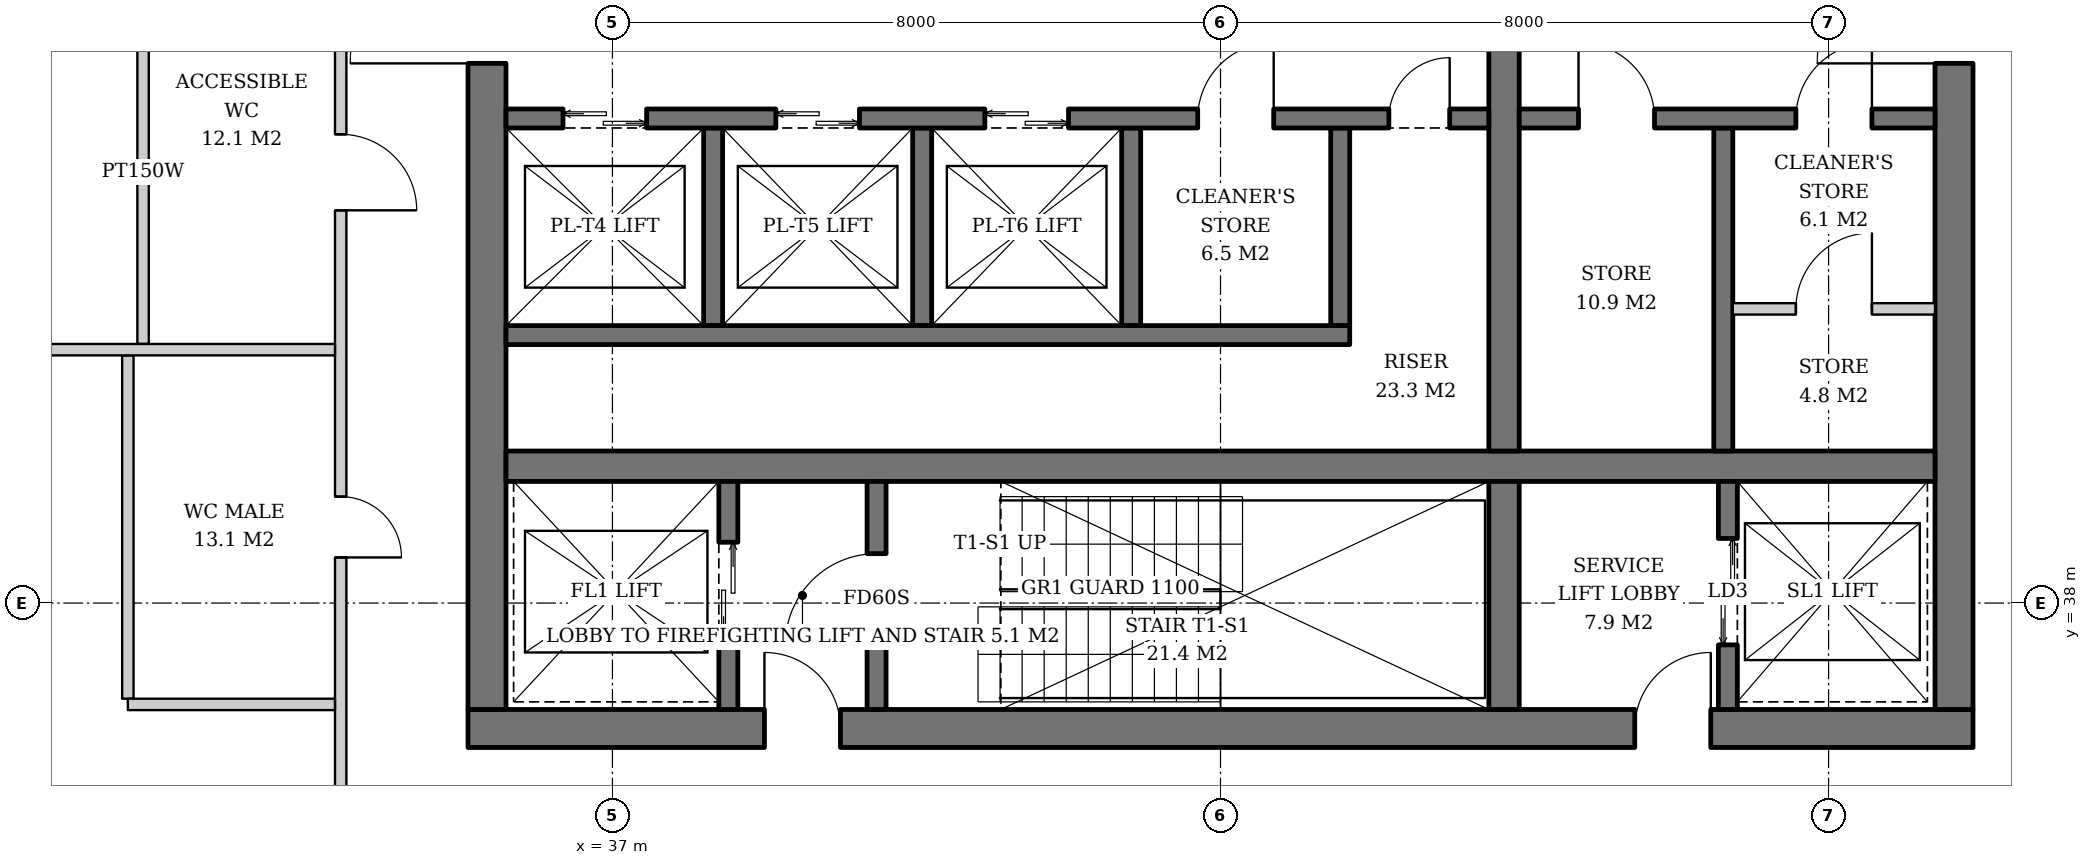
"""IFC4 building model, lengths in metres.
Left out: names, types, materials, properties, quantities, classifications, styles, units other than length and angle.
Written with IfcOpenShell. Run it as: python <this file> out.ifc"""

import sys

from ifc_helpers import new_model, si_unit, direction, frame, frame_2d, origin, place, context, subcontext, project, spatial, rectangle, extrude, element, fill, save


model = new_model("IFC4")
c1 = context("Model", 3, precision=1e-05, world=origin(), true_north=direction((0.0, 1.0)))
c2 = subcontext(c1, "Body", "Model", "MODEL_VIEW")
j1 = project(units=[si_unit("LENGTHUNIT", "METRE"), si_unit("PLANEANGLEUNIT", "RADIAN")], contexts=[c1])
p1 = place(None, origin())
s1 = spatial("IfcSite", under=j1, at=p1, CompositionType="ELEMENT")
p2 = place(p1, origin())
s2 = spatial("IfcBuilding", under=s1, at=p2, CompositionType="ELEMENT")
p3 = place(p2, frame((0.0, 0.0, 268.0)))
s3 = spatial("IfcBuildingStorey", under=s2, at=p3, CompositionType="ELEMENT", Elevation=268.0)
p4 = place(p3, frame((35.1, 36.35, 0.0), z_axis=(0.0, 0.0, 1.0), x_axis=(1.0, 0.0, 0.0)))
e1 = element("IfcWall", 1, at=p4, inside=s3, PredefinedType="SHEAR", context=c2, shape_type="SweptSolid", body=[
    extrude(rectangle(XDim=19.8, YDim=0.5, at=frame_2d((9.9, 0.0))), origin(), (0.0, 0.0, 1.0), 3.8),
])
p5 = place(p4, frame((3.9, 0.0, 0.0)))
e2 = element("IfcOpeningElement", 2, at=p5, cuts=e1, PredefinedType="OPENING", context=c2, shape_type="SweptSolid", body=[
    extrude(rectangle(XDim=1.0, YDim=2.1, at=frame_2d((0.5, 1.05))), frame((0.0, 0.26, 0.0), z_axis=(0.0, -1.0, 0.0), x_axis=(1.0, 0.0, 0.0)), (0.0, 0.0, 1.0), 0.52),
])
p6 = place(p4, frame((15.35, 0.0, 0.0)))
e3 = element("IfcOpeningElement", 3, at=p6, cuts=e1, PredefinedType="OPENING", context=c2, shape_type="SweptSolid", body=[
    extrude(rectangle(XDim=1.0, YDim=2.1, at=frame_2d((0.5, 1.05))), frame((0.0, 0.26, 0.0), z_axis=(0.0, -1.0, 0.0), x_axis=(1.0, 0.0, 0.0)), (0.0, 0.0, 1.0), 0.52),
])
p7 = place(p3, frame((35.35, 36.6, 0.0), z_axis=(0.0, 0.0, 1.0), x_axis=(0.0, 1.0, 0.0)))
e4 = element("IfcWall", 4, at=p7, inside=s3, PredefinedType="SHEAR", context=c2, shape_type="SweptSolid", body=[
    extrude(rectangle(XDim=18.8, YDim=0.5, at=frame_2d((9.4, 0.0))), origin(), (0.0, 0.0, 1.0), 3.8),
])
p8 = place(p7, frame((8.5, 0.0, 0.0)))
e5 = element("IfcOpeningElement", 5, at=p8, cuts=e4, PredefinedType="OPENING", context=c2, shape_type="SweptSolid", body=[
    extrude(rectangle(XDim=1.8, YDim=2.4, at=frame_2d((0.9, 1.2))), frame((0.0, 0.26, 0.0), z_axis=(0.0, -1.0, 0.0), x_axis=(1.0, 0.0, 0.0)), (0.0, 0.0, 1.0), 0.52),
])
p9 = place(p3, frame((54.65, 36.6, 0.0), z_axis=(0.0, 0.0, 1.0), x_axis=(0.0, 1.0, 0.0)))
e6 = element("IfcWall", 6, at=p9, inside=s3, PredefinedType="SHEAR", context=c2, shape_type="SweptSolid", body=[
    extrude(rectangle(XDim=18.8, YDim=0.5, at=frame_2d((9.4, 0.0))), origin(), (0.0, 0.0, 1.0), 3.8),
])
p10 = place(p9, frame((8.5, 0.0, 0.0)))
e7 = element("IfcOpeningElement", 7, at=p10, cuts=e6, PredefinedType="OPENING", context=c2, shape_type="SweptSolid", body=[
    extrude(rectangle(XDim=1.8, YDim=2.4, at=frame_2d((0.9, 1.2))), frame((0.0, 0.26, 0.0), z_axis=(0.0, -1.0, 0.0), x_axis=(1.0, 0.0, 0.0)), (0.0, 0.0, 1.0), 0.52),
])
p11 = place(p3, frame((35.6, 39.8, 0.0), z_axis=(0.0, 0.0, 1.0), x_axis=(1.0, 0.0, 0.0)))
e8 = element("IfcWall", 8, at=p11, inside=s3, PredefinedType="SHEAR", context=c2, shape_type="SweptSolid", body=[
    extrude(rectangle(XDim=18.8, YDim=0.4, at=frame_2d((9.4, 0.0))), origin(), (0.0, 0.0, 1.0), 3.8),
])
p12 = place(p3, frame((48.73, 36.6, 0.0), z_axis=(0.0, 0.0, 1.0), x_axis=(0.0, 1.0, 0.0)))
e9 = element("IfcWall", 9, at=p12, inside=s3, PredefinedType="SHEAR", context=c2, shape_type="SweptSolid", body=[
    extrude(rectangle(XDim=3.0, YDim=0.4, at=frame_2d((1.5, 0.0))), origin(), (0.0, 0.0, 1.0), 3.8),
])
p13 = place(p3, frame((48.73, 40.0, 0.0), z_axis=(0.0, 0.0, 1.0), x_axis=(0.0, 1.0, 0.0)))
e10 = element("IfcWall", 10, at=p13, inside=s3, PredefinedType="SHEAR", context=c2, shape_type="SweptSolid", body=[
    extrude(rectangle(XDim=12.0, YDim=0.4, at=frame_2d((6.0, 0.0))), origin(), (0.0, 0.0, 1.0), 3.8),
])
p14 = place(p3, frame((38.525, 36.6, 0.0), z_axis=(0.0, 0.0, 1.0), x_axis=(0.0, 1.0, 0.0)))
e11 = element("IfcWall", 11, at=p14, inside=s3, PredefinedType="SHEAR", context=c2, shape_type="SweptSolid", body=[
    extrude(rectangle(XDim=3.0, YDim=0.25, at=frame_2d((1.5, 0.0))), origin(), (0.0, 0.0, 1.0), 3.8),
])
p15 = place(p14, frame((0.9, 0.0, 0.0)))
e12 = element("IfcOpeningElement", 12, at=p15, cuts=e11, PredefinedType="OPENING", context=c2, shape_type="SweptSolid", body=[
    extrude(rectangle(XDim=1.3, YDim=2.2, at=frame_2d((0.65, 1.1))), frame((0.0, 0.135, 0.0), z_axis=(0.0, -1.0, 0.0), x_axis=(1.0, 0.0, 0.0)), (0.0, 0.0, 1.0), 0.27),
])
p16 = place(p3, frame((40.475, 36.6, 0.0), z_axis=(0.0, 0.0, 1.0), x_axis=(0.0, 1.0, 0.0)))
e13 = element("IfcWall", 13, at=p16, inside=s3, PredefinedType="SHEAR", context=c2, shape_type="SweptSolid", body=[
    extrude(rectangle(XDim=3.0, YDim=0.25, at=frame_2d((1.5, 0.0))), origin(), (0.0, 0.0, 1.0), 3.8),
])
p17 = place(p16, frame((0.85, 0.0, 0.0)))
e14 = element("IfcOpeningElement", 14, at=p17, cuts=e13, PredefinedType="OPENING", context=c2, shape_type="SweptSolid", body=[
    extrude(rectangle(XDim=1.2, YDim=2.1, at=frame_2d((0.6, 1.05))), frame((0.0, 0.135, 0.0), z_axis=(0.0, -1.0, 0.0), x_axis=(1.0, 0.0, 0.0)), (0.0, 0.0, 1.0), 0.27),
])
p18 = place(p3, frame((51.675, 36.6, 0.0), z_axis=(0.0, 0.0, 1.0), x_axis=(0.0, 1.0, 0.0)))
e15 = element("IfcWall", 15, at=p18, inside=s3, PredefinedType="SHEAR", context=c2, shape_type="SweptSolid", body=[
    extrude(rectangle(XDim=3.0, YDim=0.25, at=frame_2d((1.5, 0.0))), origin(), (0.0, 0.0, 1.0), 3.8),
])
p19 = place(p18, frame((0.85, 0.0, 0.0)))
e16 = element("IfcOpeningElement", 16, at=p19, cuts=e15, PredefinedType="OPENING", context=c2, shape_type="SweptSolid", body=[
    extrude(rectangle(XDim=1.4, YDim=2.4, at=frame_2d((0.7, 1.2))), frame((0.0, 0.135, 0.0), z_axis=(0.0, -1.0, 0.0), x_axis=(1.0, 0.0, 0.0)), (0.0, 0.0, 1.0), 0.27),
])
for number, where, z_axis, x_axis in (
    (17, (38.325, 44.25, 0.0), (0.0, 0.0, 1.0), (0.0, -1.0, 0.0)),
    (18, (41.075, 44.25, 0.0), (0.0, 0.0, 1.0), (0.0, -1.0, 0.0)),
    (19, (43.825, 44.25, 0.0), (0.0, 0.0, 1.0), (0.0, -1.0, 0.0)),
    (20, (46.575, 44.25, 0.0), (0.0, 0.0, 1.0), (0.0, -1.0, 0.0)),
):
    element("IfcWall", number, at=place(p3, frame(where, z_axis=z_axis, x_axis=x_axis)), inside=s3, PredefinedType="SHEAR", context=c2, shape_type="SweptSolid", body=[
        extrude(rectangle(XDim=2.6, YDim=0.25, at=frame_2d((1.3, 0.0))), origin(), (0.0, 0.0, 1.0), 3.8),
    ])
p20 = place(p3, frame((35.6, 41.525, 0.0), z_axis=(0.0, 0.0, 1.0), x_axis=(1.0, 0.0, 0.0)))
e21 = element("IfcWall", 21, at=p20, inside=s3, PredefinedType="SHEAR", context=c2, shape_type="SweptSolid", body=[
    extrude(rectangle(XDim=11.1, YDim=0.25, at=frame_2d((5.55, 0.0))), origin(), (0.0, 0.0, 1.0), 3.8),
])
p21 = place(p3, frame((35.6, 44.375, 0.0), z_axis=(0.0, 0.0, 1.0), x_axis=(1.0, 0.0, 0.0)))
e22 = element("IfcWall", 22, at=p21, inside=s3, PredefinedType="SHEAR", context=c2, shape_type="SweptSolid", body=[
    extrude(rectangle(XDim=12.93, YDim=0.25, at=frame_2d((6.465, 0.0))), origin(), (0.0, 0.0, 1.0), 3.8),
])
p22 = place(p21, frame((0.75, 0.0, 0.0)))
e23 = element("IfcOpeningElement", 23, at=p22, cuts=e22, PredefinedType="OPENING", context=c2, shape_type="SweptSolid", body=[
    extrude(rectangle(XDim=1.1, YDim=2.2, at=frame_2d((0.55, 1.1))), frame((0.0, 0.135, 0.0), z_axis=(0.0, -1.0, 0.0), x_axis=(1.0, 0.0, 0.0)), (0.0, 0.0, 1.0), 0.27),
])
p23 = place(p21, frame((3.55, 0.0, 0.0)))
e24 = element("IfcOpeningElement", 24, at=p23, cuts=e22, PredefinedType="OPENING", context=c2, shape_type="SweptSolid", body=[
    extrude(rectangle(XDim=1.1, YDim=2.2, at=frame_2d((0.55, 1.1))), frame((0.0, 0.135, 0.0), z_axis=(0.0, -1.0, 0.0), x_axis=(1.0, 0.0, 0.0)), (0.0, 0.0, 1.0), 0.27),
])
p24 = place(p21, frame((6.3, 0.0, 0.0)))
e25 = element("IfcOpeningElement", 25, at=p24, cuts=e22, PredefinedType="OPENING", context=c2, shape_type="SweptSolid", body=[
    extrude(rectangle(XDim=1.1, YDim=2.2, at=frame_2d((0.55, 1.1))), frame((0.0, 0.135, 0.0), z_axis=(0.0, -1.0, 0.0), x_axis=(1.0, 0.0, 0.0)), (0.0, 0.0, 1.0), 0.27),
])
p25 = place(p21, frame((9.1, 0.0, 0.0)))
e26 = element("IfcOpeningElement", 26, at=p25, cuts=e22, PredefinedType="OPENING", context=c2, shape_type="SweptSolid", body=[
    extrude(rectangle(XDim=1.0, YDim=2.1, at=frame_2d((0.5, 1.05))), frame((0.0, 0.135, 0.0), z_axis=(0.0, -1.0, 0.0), x_axis=(1.0, 0.0, 0.0)), (0.0, 0.0, 1.0), 0.27),
])
p26 = place(p21, frame((11.615, 0.0, 0.0)))
e27 = element("IfcOpeningElement", 27, at=p26, cuts=e22, PredefinedType="OPENING", context=c2, shape_type="SweptSolid", body=[
    extrude(rectangle(XDim=0.8, YDim=2.0, at=frame_2d((0.4, 1.0))), frame((0.0, 0.135, 0.0), z_axis=(0.0, -1.0, 0.0), x_axis=(1.0, 0.0, 0.0)), (0.0, 0.0, 1.0), 0.27),
])
p27 = place(p3, frame((51.615, 44.25, 0.0), z_axis=(0.0, 0.0, 1.0), x_axis=(0.0, -1.0, 0.0)))
e28 = element("IfcWall", 28, at=p27, inside=s3, PredefinedType="SHEAR", context=c2, shape_type="SweptSolid", body=[
    extrude(rectangle(XDim=4.25, YDim=0.25, at=frame_2d((2.125, 0.0))), origin(), (0.0, 0.0, 1.0), 3.8),
])
p28 = place(p3, frame((48.93, 44.375, 0.0), z_axis=(0.0, 0.0, 1.0), x_axis=(1.0, 0.0, 0.0)))
e29 = element("IfcWall", 29, at=p28, inside=s3, PredefinedType="SHEAR", context=c2, shape_type="SweptSolid", body=[
    extrude(rectangle(XDim=5.47, YDim=0.25, at=frame_2d((2.735, 0.0))), origin(), (0.0, 0.0, 1.0), 3.8),
])
p29 = place(p28, frame((0.78, 0.0, 0.0)))
e30 = element("IfcOpeningElement", 30, at=p29, cuts=e29, PredefinedType="OPENING", context=c2, shape_type="SweptSolid", body=[
    extrude(rectangle(XDim=1.0, YDim=2.1, at=frame_2d((0.5, 1.05))), frame((0.0, 0.135, 0.0), z_axis=(0.0, -1.0, 0.0), x_axis=(1.0, 0.0, 0.0)), (0.0, 0.0, 1.0), 0.27),
])
p30 = place(p28, frame((3.64, 0.0, 0.0)))
e31 = element("IfcOpeningElement", 31, at=p30, cuts=e29, PredefinedType="OPENING", context=c2, shape_type="SweptSolid", body=[
    extrude(rectangle(XDim=1.0, YDim=2.1, at=frame_2d((0.5, 1.05))), frame((0.0, 0.135, 0.0), z_axis=(0.0, -1.0, 0.0), x_axis=(1.0, 0.0, 0.0)), (0.0, 0.0, 1.0), 0.27),
])
p31 = place(p3, frame((51.74, 41.87, 0.0), z_axis=(0.0, 0.0, 1.0), x_axis=(1.0, 0.0, 0.0)))
e32 = element("IfcWall", 32, at=p31, inside=s3, PredefinedType="SOLIDWALL", context=c2, shape_type="SweptSolid", body=[
    extrude(rectangle(XDim=2.66, YDim=0.15, at=frame_2d((1.33, 0.0))), origin(), (0.0, 0.0, 1.0), 3.62),
])
p32 = place(p31, frame((0.83, 0.0, 0.0)))
e33 = element("IfcOpeningElement", 33, at=p32, cuts=e32, PredefinedType="OPENING", context=c2, shape_type="SweptSolid", body=[
    extrude(rectangle(XDim=1.0, YDim=2.1, at=frame_2d((0.5, 1.05))), frame((0.0, 0.085, 0.0), z_axis=(0.0, -1.0, 0.0), x_axis=(1.0, 0.0, 0.0)), (0.0, 0.0, 1.0), 0.17),
])
for number, where, z_axis, x_axis in (
    (34, (30.825, 45.925, 0.0), (0.0, 0.0, 1.0), (0.0, -1.0, 0.0)),
    (35, (30.625, 41.258, 0.0), (0.0, 0.0, 1.0), (0.0, -1.0, 0.0)),
):
    element("IfcWall", number, at=place(p3, frame(where, z_axis=z_axis, x_axis=x_axis)), inside=s3, PredefinedType="PARTITIONING", context=c2, shape_type="SweptSolid", body=[
        extrude(rectangle(XDim=4.517, YDim=0.15, at=frame_2d((2.258, 0.0))), origin(), (0.0, 0.0, 1.0), 3.12),
    ])
p33 = place(p3, frame((33.425, 57.273, 0.0), z_axis=(0.0, 0.0, 1.0), x_axis=(0.0, -1.0, 0.0)))
e36 = element("IfcWall", 36, at=p33, inside=s3, PredefinedType="PARTITIONING", context=c2, shape_type="SweptSolid", body=[
    extrude(rectangle(XDim=22.546, YDim=0.15, at=frame_2d((11.273, 0.0))), origin(), (0.0, 0.0, 1.0), 3.02),
])
p34 = place(p33, frame((3.773, 0.0, 0.0)))
e37 = element("IfcOpeningElement", 37, at=p34, cuts=e36, PredefinedType="OPENING", context=c2, shape_type="SweptSolid", body=[
    extrude(rectangle(XDim=1.0, YDim=2.1, at=frame_2d((0.5, 1.05))), frame((0.0, 0.085, 0.0), z_axis=(0.0, -1.0, 0.0), x_axis=(1.0, 0.0, 0.0)), (0.0, 0.0, 1.0), 0.17),
])
p35 = place(p33, frame((8.54, 0.0, 0.0)))
e38 = element("IfcOpeningElement", 38, at=p35, cuts=e36, PredefinedType="OPENING", context=c2, shape_type="SweptSolid", body=[
    extrude(rectangle(XDim=0.8, YDim=2.1, at=frame_2d((0.4, 1.05))), frame((0.0, 0.085, 0.0), z_axis=(0.0, -1.0, 0.0), x_axis=(1.0, 0.0, 0.0)), (0.0, 0.0, 1.0), 0.17),
])
p36 = place(p33, frame((13.106, 0.0, 0.0)))
e39 = element("IfcOpeningElement", 39, at=p36, cuts=e36, PredefinedType="OPENING", context=c2, shape_type="SweptSolid", body=[
    extrude(rectangle(XDim=1.0, YDim=2.1, at=frame_2d((0.5, 1.05))), frame((0.0, 0.085, 0.0), z_axis=(0.0, -1.0, 0.0), x_axis=(1.0, 0.0, 0.0)), (0.0, 0.0, 1.0), 0.17),
])
p37 = place(p33, frame((17.873, 0.0, 0.0)))
e40 = element("IfcOpeningElement", 40, at=p37, cuts=e36, PredefinedType="OPENING", context=c2, shape_type="SweptSolid", body=[
    extrude(rectangle(XDim=0.8, YDim=2.1, at=frame_2d((0.4, 1.05))), frame((0.0, 0.085, 0.0), z_axis=(0.0, -1.0, 0.0), x_axis=(1.0, 0.0, 0.0)), (0.0, 0.0, 1.0), 0.17),
])
p38 = place(p3, frame((33.35, 41.333, 0.0), z_axis=(0.0, 0.0, 1.0), x_axis=(-1.0, 0.0, 0.0)))
e41 = element("IfcWall", 41, at=p38, inside=s3, PredefinedType="PARTITIONING", context=c2, shape_type="SweptSolid", body=[
    extrude(rectangle(XDim=4.109, YDim=0.15, at=frame_2d((2.055, 0.0))), origin(), (0.0, 0.0, 1.0), 3.62),
])
p39 = place(p3, frame((33.35, 36.667, 0.0), z_axis=(0.0, 0.0, 1.0), x_axis=(-1.0, 0.0, 0.0)))
e42 = element("IfcWall", 42, at=p39, inside=s3, PredefinedType="PARTITIONING", context=c2, shape_type="SweptSolid", body=[
    extrude(rectangle(XDim=2.725, YDim=0.15, at=frame_2d((1.363, 0.0))), origin(), (0.0, 0.0, 1.0), 3.62),
])
p40 = place(p15, origin())
e43 = element("IfcDoor", 43, at=p40, inside=s3, OperationType="DOUBLE_DOOR_SLIDING", PredefinedType="DOOR", context=c2, shape_type="SweptSolid", body=[
    extrude(rectangle(XDim=1.3, YDim=2.2, at=frame_2d((0.65, 1.1))), frame((0.0, 0.025, 0.0), z_axis=(0.0, -1.0, 0.0), x_axis=(1.0, 0.0, 0.0)), (0.0, 0.0, 1.0), 0.05),
])
fill(e12, e43)
p41 = place(p17, origin())
e44 = element("IfcDoor", 44, at=p41, inside=s3, OperationType="SINGLE_SWING_LEFT", PredefinedType="DOOR", context=c2, shape_type="SweptSolid", body=[
    extrude(rectangle(XDim=1.2, YDim=2.1, at=frame_2d((0.6, 1.05))), frame((0.0, 0.025, 0.0), z_axis=(0.0, -1.0, 0.0), x_axis=(1.0, 0.0, 0.0)), (0.0, 0.0, 1.0), 0.05),
])
fill(e14, e44)
p42 = place(p19, origin())
e45 = element("IfcDoor", 45, at=p42, inside=s3, OperationType="DOUBLE_DOOR_SLIDING", PredefinedType="DOOR", context=c2, shape_type="SweptSolid", body=[
    extrude(rectangle(XDim=1.4, YDim=2.4, at=frame_2d((0.7, 1.2))), frame((0.0, 0.025, 0.0), z_axis=(0.0, -1.0, 0.0), x_axis=(1.0, 0.0, 0.0)), (0.0, 0.0, 1.0), 0.05),
])
fill(e16, e45)
p43 = place(p22, origin())
e46 = element("IfcDoor", 46, at=p43, inside=s3, OperationType="DOUBLE_DOOR_SLIDING", PredefinedType="DOOR", context=c2, shape_type="SweptSolid", body=[
    extrude(rectangle(XDim=1.1, YDim=2.2, at=frame_2d((0.55, 1.1))), frame((0.0, 0.025, 0.0), z_axis=(0.0, -1.0, 0.0), x_axis=(1.0, 0.0, 0.0)), (0.0, 0.0, 1.0), 0.05),
])
fill(e23, e46)
p44 = place(p23, origin())
e47 = element("IfcDoor", 47, at=p44, inside=s3, OperationType="DOUBLE_DOOR_SLIDING", PredefinedType="DOOR", context=c2, shape_type="SweptSolid", body=[
    extrude(rectangle(XDim=1.1, YDim=2.2, at=frame_2d((0.55, 1.1))), frame((0.0, 0.025, 0.0), z_axis=(0.0, -1.0, 0.0), x_axis=(1.0, 0.0, 0.0)), (0.0, 0.0, 1.0), 0.05),
])
fill(e24, e47)
p45 = place(p24, origin())
e48 = element("IfcDoor", 48, at=p45, inside=s3, OperationType="DOUBLE_DOOR_SLIDING", PredefinedType="DOOR", context=c2, shape_type="SweptSolid", body=[
    extrude(rectangle(XDim=1.1, YDim=2.2, at=frame_2d((0.55, 1.1))), frame((0.0, 0.025, 0.0), z_axis=(0.0, -1.0, 0.0), x_axis=(1.0, 0.0, 0.0)), (0.0, 0.0, 1.0), 0.05),
])
fill(e25, e48)
p46 = place(p25, origin())
e49 = element("IfcDoor", 49, at=p46, inside=s3, OperationType="SINGLE_SWING_RIGHT", PredefinedType="DOOR", context=c2, shape_type="SweptSolid", body=[
    extrude(rectangle(XDim=1.0, YDim=2.1, at=frame_2d((0.5, 1.05))), frame((0.0, 0.025, 0.0), z_axis=(0.0, -1.0, 0.0), x_axis=(1.0, 0.0, 0.0)), (0.0, 0.0, 1.0), 0.05),
])
fill(e26, e49)
p47 = place(p26, origin())
e50 = element("IfcDoor", 50, at=p47, inside=s3, OperationType="SINGLE_SWING_RIGHT", PredefinedType="DOOR", context=c2, shape_type="SweptSolid", body=[
    extrude(rectangle(XDim=0.8, YDim=2.0, at=frame_2d((0.4, 1.0))), frame((0.0, 0.025, 0.0), z_axis=(0.0, -1.0, 0.0), x_axis=(1.0, 0.0, 0.0)), (0.0, 0.0, 1.0), 0.05),
])
fill(e27, e50)
p48 = place(p29, origin())
e51 = element("IfcDoor", 51, at=p48, inside=s3, OperationType="SINGLE_SWING_LEFT", PredefinedType="DOOR", context=c2, shape_type="SweptSolid", body=[
    extrude(rectangle(XDim=1.0, YDim=2.1, at=frame_2d((0.5, 1.05))), frame((0.0, 0.025, 0.0), z_axis=(0.0, -1.0, 0.0), x_axis=(1.0, 0.0, 0.0)), (0.0, 0.0, 1.0), 0.05),
])
fill(e30, e51)
p49 = place(p30, origin())
e52 = element("IfcDoor", 52, at=p49, inside=s3, OperationType="SINGLE_SWING_RIGHT", PredefinedType="DOOR", context=c2, shape_type="SweptSolid", body=[
    extrude(rectangle(XDim=1.0, YDim=2.1, at=frame_2d((0.5, 1.05))), frame((0.0, 0.025, 0.0), z_axis=(0.0, -1.0, 0.0), x_axis=(1.0, 0.0, 0.0)), (0.0, 0.0, 1.0), 0.05),
])
fill(e31, e52)
p50 = place(p32, origin())
e53 = element("IfcDoor", 53, at=p50, inside=s3, OperationType="SINGLE_SWING_RIGHT", PredefinedType="DOOR", context=c2, shape_type="SweptSolid", body=[
    extrude(rectangle(XDim=1.0, YDim=2.1, at=frame_2d((0.5, 1.05))), frame((0.0, 0.025, 0.0), z_axis=(0.0, -1.0, 0.0), x_axis=(1.0, 0.0, 0.0)), (0.0, 0.0, 1.0), 0.05),
])
fill(e33, e53)
p51 = place(p5, origin())
e54 = element("IfcDoor", 54, at=p51, inside=s3, OperationType="SINGLE_SWING_LEFT", PredefinedType="DOOR", context=c2, shape_type="SweptSolid", body=[
    extrude(rectangle(XDim=1.0, YDim=2.1, at=frame_2d((0.5, 1.05))), frame((0.0, 0.025, 0.0), z_axis=(0.0, -1.0, 0.0), x_axis=(1.0, 0.0, 0.0)), (0.0, 0.0, 1.0), 0.05),
])
fill(e2, e54)
p52 = place(p8, origin())
e55 = element("IfcDoor", 55, at=p52, inside=s3, OperationType="DOUBLE_DOOR_SINGLE_SWING", PredefinedType="DOOR", context=c2, shape_type="SweptSolid", body=[
    extrude(rectangle(XDim=1.8, YDim=2.4, at=frame_2d((0.9, 1.2))), frame((0.0, 0.025, 0.0), z_axis=(0.0, -1.0, 0.0), x_axis=(1.0, 0.0, 0.0)), (0.0, 0.0, 1.0), 0.05),
])
fill(e5, e55)
p53 = place(p10, origin())
e56 = element("IfcDoor", 56, at=p53, inside=s3, OperationType="DOUBLE_DOOR_SINGLE_SWING", PredefinedType="DOOR", context=c2, shape_type="SweptSolid", body=[
    extrude(rectangle(XDim=1.8, YDim=2.4, at=frame_2d((0.9, 1.2))), frame((0.0, 0.025, 0.0), z_axis=(0.0, -1.0, 0.0), x_axis=(1.0, 0.0, 0.0)), (0.0, 0.0, 1.0), 0.05),
])
fill(e7, e56)
p54 = place(p6, origin())
e57 = element("IfcDoor", 57, at=p54, inside=s3, OperationType="SINGLE_SWING_RIGHT", PredefinedType="DOOR", context=c2, shape_type="SweptSolid", body=[
    extrude(rectangle(XDim=1.0, YDim=2.1, at=frame_2d((0.5, 1.05))), frame((0.0, 0.025, 0.0), z_axis=(0.0, -1.0, 0.0), x_axis=(1.0, 0.0, 0.0)), (0.0, 0.0, 1.0), 0.05),
])
fill(e3, e57)
p55 = place(p36, origin())
e58 = element("IfcDoor", 58, at=p55, inside=s3, OperationType="SINGLE_SWING_RIGHT", PredefinedType="DOOR", context=c2, shape_type="SweptSolid", body=[
    extrude(rectangle(XDim=1.0, YDim=2.1, at=frame_2d((0.5, 1.05))), frame((0.0, 0.025, 0.0), z_axis=(0.0, -1.0, 0.0), x_axis=(1.0, 0.0, 0.0)), (0.0, 0.0, 1.0), 0.05),
])
fill(e39, e58)
p56 = place(p37, origin())
e59 = element("IfcDoor", 59, at=p56, inside=s3, OperationType="SINGLE_SWING_RIGHT", PredefinedType="DOOR", context=c2, shape_type="SweptSolid", body=[
    extrude(rectangle(XDim=0.8, YDim=2.1, at=frame_2d((0.4, 1.05))), frame((0.0, 0.025, 0.0), z_axis=(0.0, -1.0, 0.0), x_axis=(1.0, 0.0, 0.0)), (0.0, 0.0, 1.0), 0.05),
])
fill(e40, e59)
save(model, sys.argv[1])
